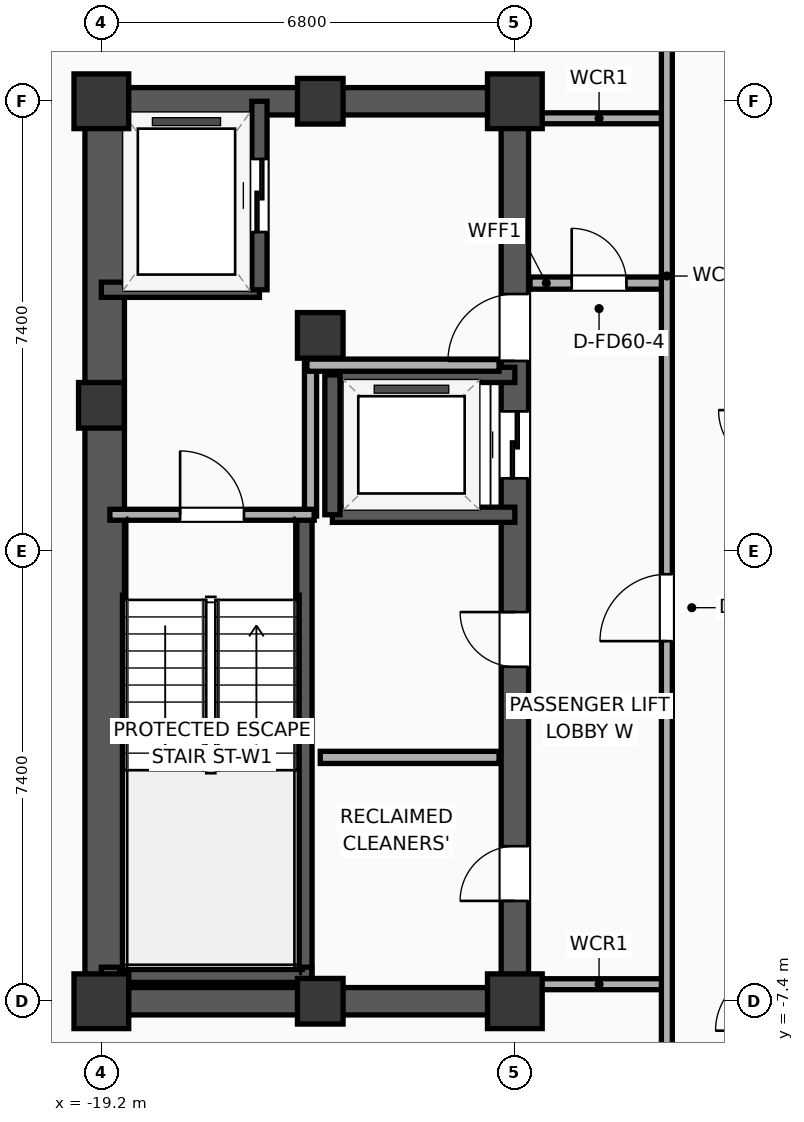
"""IFC4 building model, lengths in metres.
Left out: names, types, materials, properties, quantities, classifications, styles, units other than length and angle.
Written with IfcOpenShell. Run it as: python <this file> out.ifc"""

import sys

from ifc_helpers import new_model, si_unit, direction, frame, frame_2d, origin, origin_2d, place, context, subcontext, project, spatial, rectangle, extrude, element, fill, save


model = new_model("IFC4")
c1 = context("Model", 3, precision=1e-05, world=origin(), true_north=direction((0.0, 1.0)))
c2 = subcontext(c1, "Body", "Model", "MODEL_VIEW")
j1 = project(units=[si_unit("LENGTHUNIT", "METRE"), si_unit("PLANEANGLEUNIT", "RADIAN")], contexts=[c1])
p1 = place(None, origin())
s1 = spatial("IfcSite", under=j1, at=p1, CompositionType="ELEMENT")
p2 = place(p1, origin())
s2 = spatial("IfcBuilding", under=s1, at=p2, CompositionType="ELEMENT")
p3 = place(p2, frame((0.0, 0.0, 215.8)))
s3 = spatial("IfcBuildingStorey", under=s2, at=p3, CompositionType="ELEMENT", Elevation=215.8)
p4 = place(p3, frame((-19.2, -7.4, 0.0), z_axis=(0.0, 0.0, 1.0), x_axis=(1.0, 0.0, 0.0)))
e1 = element("IfcColumn", 1, at=p4, inside=s3, PredefinedType="COLUMN", context=c2, shape_type="SweptSolid", body=[
    extrude(rectangle(XDim=0.9, YDim=0.9, at=origin_2d()), origin(), (0.0, 0.0, 1.0), 3.9),
])
p5 = place(p3, frame((-19.2, 2.4, 0.0), z_axis=(0.0, 0.0, 1.0), x_axis=(1.0, 0.0, 0.0)))
e2 = element("IfcColumn", 2, at=p5, inside=s3, PredefinedType="COLUMN", context=c2, shape_type="SweptSolid", body=[
    extrude(rectangle(XDim=0.75, YDim=0.75, at=origin_2d()), origin(), (0.0, 0.0, 1.0), 3.9),
])
p6 = place(p3, frame((-19.2, 7.4, 0.0), z_axis=(0.0, 0.0, 1.0), x_axis=(1.0, 0.0, 0.0)))
e3 = element("IfcColumn", 3, at=p6, inside=s3, PredefinedType="COLUMN", context=c2, shape_type="SweptSolid", body=[
    extrude(rectangle(XDim=0.9, YDim=0.9, at=origin_2d()), origin(), (0.0, 0.0, 1.0), 3.9),
])
for number, where, z_axis, x_axis in (
    (4, (-15.6, -7.4, 0.0), (0.0, 0.0, 1.0), (1.0, 0.0, 0.0)),
    (5, (-15.6, 7.4, 0.0), (0.0, 0.0, 1.0), (1.0, 0.0, 0.0)),
):
    element("IfcColumn", number, at=place(p3, frame(where, z_axis=z_axis, x_axis=x_axis)), inside=s3, PredefinedType="COLUMN", context=c2, shape_type="SweptSolid", body=[
        extrude(rectangle(XDim=0.75, YDim=0.75, at=origin_2d()), origin(), (0.0, 0.0, 1.0), 3.9),
    ])
p7 = place(p3, frame((-12.4, -7.4, 0.0), z_axis=(0.0, 0.0, 1.0), x_axis=(1.0, 0.0, 0.0)))
e6 = element("IfcColumn", 6, at=p7, inside=s3, PredefinedType="COLUMN", context=c2, shape_type="SweptSolid", body=[
    extrude(rectangle(XDim=0.9, YDim=0.9, at=origin_2d()), origin(), (0.0, 0.0, 1.0), 3.9),
])
p8 = place(p3, frame((-15.6, 3.55, 0.0), z_axis=(0.0, 0.0, 1.0), x_axis=(1.0, 0.0, 0.0)))
e7 = element("IfcColumn", 7, at=p8, inside=s3, PredefinedType="COLUMN", context=c2, shape_type="SweptSolid", body=[
    extrude(rectangle(XDim=0.75, YDim=0.75, at=origin_2d()), origin(), (0.0, 0.0, 1.0), 3.9),
])
p9 = place(p3, frame((-12.4, 7.4, 0.0), z_axis=(0.0, 0.0, 1.0), x_axis=(1.0, 0.0, 0.0)))
e8 = element("IfcColumn", 8, at=p9, inside=s3, PredefinedType="COLUMN", context=c2, shape_type="SweptSolid", body=[
    extrude(rectangle(XDim=0.9, YDim=0.9, at=origin_2d()), origin(), (0.0, 0.0, 1.0), 3.9),
])
for number, where, z_axis, x_axis in (
    (9, (-19.425, -7.4, 0.0), (0.0, 0.0, 1.0), (1.0, 0.0, 0.0)),
    (10, (-19.425, 7.4, 0.0), (0.0, 0.0, 1.0), (1.0, 0.0, 0.0)),
):
    element("IfcWall", number, at=place(p3, frame(where, z_axis=z_axis, x_axis=x_axis)), inside=s3, PredefinedType="SHEAR", context=c2, shape_type="SweptSolid", body=[
        extrude(rectangle(XDim=7.25, YDim=0.45, at=frame_2d((3.625, 0.0))), origin(), (0.0, 0.0, 1.0), 3.65),
    ])
p10 = place(p3, frame((-19.145, -7.4, 0.0), z_axis=(0.0, 0.0, 1.0), x_axis=(0.0, 1.0, 0.0)))
e11 = element("IfcWall", 11, at=p10, inside=s3, PredefinedType="SHEAR", context=c2, shape_type="SweptSolid", body=[
    extrude(rectangle(XDim=14.8, YDim=0.65, at=frame_2d((7.4, 0.0))), origin(), (0.0, 0.0, 1.0), 3.65),
])
p11 = place(p3, frame((-12.4, -7.4, 0.0), z_axis=(0.0, 0.0, 1.0), x_axis=(0.0, 1.0, 0.0)))
e12 = element("IfcWall", 12, at=p11, inside=s3, PredefinedType="SHEAR", context=c2, shape_type="SweptSolid", body=[
    extrude(rectangle(XDim=14.8, YDim=0.45, at=frame_2d((7.4, 0.0))), origin(), (0.0, 0.0, 1.0), 3.65),
])
p12 = place(p11, frame((8.6, 0.0, 0.0)))
e13 = element("IfcOpeningElement", 13, at=p12, cuts=e12, PredefinedType="OPENING", context=c2, shape_type="SweptSolid", body=[
    extrude(rectangle(XDim=1.1, YDim=2.05, at=frame_2d((0.55, 1.025))), frame((0.0, 0.235, 0.0), z_axis=(0.0, -1.0, 0.0), x_axis=(1.0, 0.0, 0.0)), (0.0, 0.0, 1.0), 0.47),
])
p13 = place(p11, frame((10.53, 0.0, 0.0)))
e14 = element("IfcOpeningElement", 14, at=p13, cuts=e12, PredefinedType="OPENING", context=c2, shape_type="SweptSolid", body=[
    extrude(rectangle(XDim=1.1, YDim=2.05, at=frame_2d((0.55, 1.025))), frame((0.0, 0.235, 0.0), z_axis=(0.0, -1.0, 0.0), x_axis=(1.0, 0.0, 0.0)), (0.0, 0.0, 1.0), 0.47),
])
p14 = place(p11, frame((1.65, 0.0, 0.0)))
e15 = element("IfcOpeningElement", 15, at=p14, cuts=e12, PredefinedType="OPENING", context=c2, shape_type="SweptSolid", body=[
    extrude(rectangle(XDim=0.9, YDim=2.05, at=frame_2d((0.45, 1.025))), frame((0.0, 0.235, 0.0), z_axis=(0.0, -1.0, 0.0), x_axis=(1.0, 0.0, 0.0)), (0.0, 0.0, 1.0), 0.47),
])
p15 = place(p11, frame((5.5, 0.0, 0.0)))
e16 = element("IfcOpeningElement", 16, at=p15, cuts=e12, PredefinedType="OPENING", context=c2, shape_type="SweptSolid", body=[
    extrude(rectangle(XDim=0.9, YDim=2.05, at=frame_2d((0.45, 1.025))), frame((0.0, 0.235, 0.0), z_axis=(0.0, -1.0, 0.0), x_axis=(1.0, 0.0, 0.0)), (0.0, 0.0, 1.0), 0.47),
])
p16 = place(p3, frame((-15.86, -7.085, 0.0), z_axis=(0.0, 0.0, 1.0), x_axis=(0.0, 1.0, 0.0)))
e17 = element("IfcWall", 17, at=p16, inside=s3, PredefinedType="SOLIDWALL", context=c2, shape_type="SweptSolid", body=[
    extrude(rectangle(XDim=7.685, YDim=0.25, at=frame_2d((3.843, 0.0))), origin(), (0.0, 0.0, 1.0), 3.65),
])
p17 = place(p3, frame((-19.2, -6.965, 0.0), z_axis=(0.0, 0.0, 1.0), x_axis=(1.0, 0.0, 0.0)))
e18 = element("IfcWall", 18, at=p17, inside=s3, PredefinedType="SOLIDWALL", context=c2, shape_type="SweptSolid", body=[
    extrude(rectangle(XDim=3.46, YDim=0.25, at=frame_2d((1.73, 0.0))), origin(), (0.0, 0.0, 1.0), 3.65),
])
p18 = place(p3, frame((-19.2, 4.3, 0.0), z_axis=(0.0, 0.0, 1.0), x_axis=(1.0, 0.0, 0.0)))
e19 = element("IfcWall", 19, at=p18, inside=s3, PredefinedType="SOLIDWALL", context=c2, shape_type="SweptSolid", body=[
    extrude(rectangle(XDim=2.6, YDim=0.25, at=frame_2d((1.3, 0.0))), origin(), (0.0, 0.0, 1.0), 3.65),
])
p19 = place(p3, frame((-16.6, 4.3, 0.0), z_axis=(0.0, 0.0, 1.0), x_axis=(0.0, 1.0, 0.0)))
e20 = element("IfcWall", 20, at=p19, inside=s3, PredefinedType="SOLIDWALL", context=c2, shape_type="SweptSolid", body=[
    extrude(rectangle(XDim=3.1, YDim=0.25, at=frame_2d((1.55, 0.0))), origin(), (0.0, 0.0, 1.0), 3.65),
])
p20 = place(p19, frame((0.95, 0.0, 0.0)))
e21 = element("IfcOpeningElement", 21, at=p20, cuts=e20, PredefinedType="OPENING", context=c2, shape_type="SweptSolid", body=[
    extrude(rectangle(XDim=1.2, YDim=2.05, at=frame_2d((0.6, 1.025))), frame((0.0, 0.135, 0.0), z_axis=(0.0, -1.0, 0.0), x_axis=(1.0, 0.0, 0.0)), (0.0, 0.0, 1.0), 0.27),
])
for number, where, z_axis, x_axis in (
    (22, (-15.4, 0.6, 0.0), (0.0, 0.0, 1.0), (1.0, 0.0, 0.0)),
    (23, (-12.4, 2.9, 0.0), (0.0, 0.0, 1.0), (-1.0, 0.0, 0.0)),
):
    element("IfcWall", number, at=place(p3, frame(where, z_axis=z_axis, x_axis=x_axis)), inside=s3, PredefinedType="SOLIDWALL", context=c2, shape_type="SweptSolid", body=[
        extrude(rectangle(XDim=3.0, YDim=0.25, at=frame_2d((1.5, 0.0))), origin(), (0.0, 0.0, 1.0), 3.65),
    ])
p21 = place(p3, frame((-15.4, 2.9, 0.0), z_axis=(0.0, 0.0, 1.0), x_axis=(0.0, -1.0, 0.0)))
e24 = element("IfcWall", 24, at=p21, inside=s3, PredefinedType="SOLIDWALL", context=c2, shape_type="SweptSolid", body=[
    extrude(rectangle(XDim=2.3, YDim=0.25, at=frame_2d((1.15, 0.0))), origin(), (0.0, 0.0, 1.0), 3.65),
])
p22 = place(p3, frame((-15.76, 0.58, 0.0), z_axis=(0.0, 0.0, 1.0), x_axis=(0.0, 1.0, 0.0)))
e25 = element("IfcWall", 25, at=p22, inside=s3, PredefinedType="PARTITIONING", context=c2, shape_type="SweptSolid", body=[
    extrude(rectangle(XDim=2.52, YDim=0.2, at=frame_2d((1.26, 0.0))), origin(), (0.0, 0.0, 1.0), 3.65),
])
p23 = place(p3, frame((-15.82, 3.06, 0.0), z_axis=(0.0, 0.0, 1.0), x_axis=(1.0, 0.0, 0.0)))
e26 = element("IfcWall", 26, at=p23, inside=s3, PredefinedType="PARTITIONING", context=c2, shape_type="SweptSolid", body=[
    extrude(rectangle(XDim=3.16, YDim=0.2, at=frame_2d((1.58, 0.0))), origin(), (0.0, 0.0, 1.0), 3.65),
])
p24 = place(p3, frame((-19.06, 0.6, 0.0), z_axis=(0.0, 0.0, 1.0), x_axis=(1.0, 0.0, 0.0)))
e27 = element("IfcWall", 27, at=p24, inside=s3, PredefinedType="PARTITIONING", context=c2, shape_type="SweptSolid", body=[
    extrude(rectangle(XDim=3.36, YDim=0.18, at=frame_2d((1.68, 0.0))), origin(), (0.0, 0.0, 1.0), 3.65),
])
p25 = place(p24, frame((1.155, 0.0, 0.0)))
e28 = element("IfcOpeningElement", 28, at=p25, cuts=e27, PredefinedType="OPENING", context=c2, shape_type="SweptSolid", body=[
    extrude(rectangle(XDim=1.05, YDim=2.05, at=frame_2d((0.525, 1.025))), frame((0.0, 0.1, 0.0), z_axis=(0.0, -1.0, 0.0), x_axis=(1.0, 0.0, 0.0)), (0.0, 0.0, 1.0), 0.2),
])
p26 = place(p3, frame((-15.6, -3.39, 0.0), z_axis=(0.0, 0.0, 1.0), x_axis=(1.0, 0.0, 0.0)))
e29 = element("IfcWall", 29, at=p26, inside=s3, PredefinedType="PARTITIONING", context=c2, shape_type="SweptSolid", body=[
    extrude(rectangle(XDim=2.94, YDim=0.2, at=frame_2d((1.47, 0.0))), origin(), (0.0, 0.0, 1.0), 3.65),
])
p27 = place(p3, frame((-12.15, 4.41, 0.0), z_axis=(0.0, 0.0, 1.0), x_axis=(1.0, 0.0, 0.0)))
e30 = element("IfcWall", 30, at=p27, inside=s3, PredefinedType="PARTITIONING", context=c2, shape_type="SweptSolid", body=[
    extrude(rectangle(XDim=2.27, YDim=0.2, at=frame_2d((1.135, 0.0))), origin(), (0.0, 0.0, 1.0), 3.65),
])
p28 = place(p27, frame((0.685, 0.0, 0.0)))
e31 = element("IfcOpeningElement", 31, at=p28, cuts=e30, PredefinedType="OPENING", context=c2, shape_type="SweptSolid", body=[
    extrude(rectangle(XDim=0.9, YDim=2.05, at=frame_2d((0.45, 1.025))), frame((0.0, 0.11, 0.0), z_axis=(0.0, -1.0, 0.0), x_axis=(1.0, 0.0, 0.0)), (0.0, 0.0, 1.0), 0.22),
])
for number, where, z_axis, x_axis in (
    (32, (-12.15, 7.12, 0.0), (0.0, 0.0, 1.0), (1.0, 0.0, 0.0)),
    (33, (-12.15, -7.12, 0.0), (0.0, 0.0, 1.0), (1.0, 0.0, 0.0)),
):
    element("IfcWall", number, at=place(p3, frame(where, z_axis=z_axis, x_axis=x_axis)), inside=s3, PredefinedType="PARTITIONING", context=c2, shape_type="SweptSolid", body=[
        extrude(rectangle(XDim=2.27, YDim=0.18, at=frame_2d((1.135, 0.0))), origin(), (0.0, 0.0, 1.0), 3.65),
    ])
p29 = place(p3, frame((-9.9, -9.28, 0.0), z_axis=(0.0, 0.0, 1.0), x_axis=(0.0, 1.0, 0.0)))
e34 = element("IfcWall", 34, at=p29, inside=s3, PredefinedType="PARTITIONING", context=c2, shape_type="SweptSolid", body=[
    extrude(rectangle(XDim=18.56, YDim=0.18, at=frame_2d((9.28, 0.0))), origin(), (0.0, 0.0, 1.0), 3.65),
])
p30 = place(p29, frame((7.802, 0.0, 0.0)))
e35 = element("IfcOpeningElement", 35, at=p30, cuts=e34, PredefinedType="OPENING", context=c2, shape_type="SweptSolid", body=[
    extrude(rectangle(XDim=1.1, YDim=2.05, at=frame_2d((0.55, 1.025))), frame((0.0, 0.1, 0.0), z_axis=(0.0, -1.0, 0.0), x_axis=(1.0, 0.0, 0.0)), (0.0, 0.0, 1.0), 0.2),
])
p31 = place(p20, origin())
e36 = element("IfcDoor", 36, at=p31, inside=s3, OperationType="SLIDING_TO_LEFT", PredefinedType="DOOR", context=c2, shape_type="SweptSolid", body=[
    extrude(rectangle(XDim=1.2, YDim=2.05, at=frame_2d((0.6, 1.025))), frame((0.0, 0.025, 0.0), z_axis=(0.0, -1.0, 0.0), x_axis=(1.0, 0.0, 0.0)), (0.0, 0.0, 1.0), 0.05),
])
fill(e21, e36)
p32 = place(p12, origin())
e37 = element("IfcDoor", 37, at=p32, inside=s3, OperationType="SLIDING_TO_LEFT", PredefinedType="DOOR", context=c2, shape_type="SweptSolid", body=[
    extrude(rectangle(XDim=1.1, YDim=2.05, at=frame_2d((0.55, 1.025))), frame((0.0, 0.025, 0.0), z_axis=(0.0, -1.0, 0.0), x_axis=(1.0, 0.0, 0.0)), (0.0, 0.0, 1.0), 0.05),
])
fill(e13, e37)
p33 = place(p25, origin())
e38 = element("IfcDoor", 38, at=p33, inside=s3, OperationType="SINGLE_SWING_LEFT", PredefinedType="DOOR", context=c2, shape_type="SweptSolid", body=[
    extrude(rectangle(XDim=1.05, YDim=2.05, at=frame_2d((0.525, 1.025))), frame((0.0, 0.025, 0.0), z_axis=(0.0, -1.0, 0.0), x_axis=(1.0, 0.0, 0.0)), (0.0, 0.0, 1.0), 0.05),
])
fill(e28, e38)
p34 = place(p28, origin())
e39 = element("IfcDoor", 39, at=p34, inside=s3, OperationType="SINGLE_SWING_LEFT", PredefinedType="DOOR", context=c2, shape_type="SweptSolid", body=[
    extrude(rectangle(XDim=0.9, YDim=2.05, at=frame_2d((0.45, 1.025))), frame((0.0, 0.025, 0.0), z_axis=(0.0, -1.0, 0.0), x_axis=(1.0, 0.0, 0.0)), (0.0, 0.0, 1.0), 0.05),
])
fill(e31, e39)
p35 = place(p30, origin())
e40 = element("IfcDoor", 40, at=p35, inside=s3, OperationType="SINGLE_SWING_LEFT", PredefinedType="DOOR", context=c2, shape_type="SweptSolid", body=[
    extrude(rectangle(XDim=1.1, YDim=2.05, at=frame_2d((0.55, 1.025))), frame((0.0, 0.025, 0.0), z_axis=(0.0, -1.0, 0.0), x_axis=(1.0, 0.0, 0.0)), (0.0, 0.0, 1.0), 0.05),
])
fill(e35, e40)
p36 = place(p13, origin())
e41 = element("IfcDoor", 41, at=p36, inside=s3, OperationType="SINGLE_SWING_LEFT", PredefinedType="DOOR", context=c2, shape_type="SweptSolid", body=[
    extrude(rectangle(XDim=1.1, YDim=2.05, at=frame_2d((0.55, 1.025))), frame((0.0, 0.025, 0.0), z_axis=(0.0, -1.0, 0.0), x_axis=(1.0, 0.0, 0.0)), (0.0, 0.0, 1.0), 0.05),
])
fill(e14, e41)
p37 = place(p14, origin())
e42 = element("IfcDoor", 42, at=p37, inside=s3, OperationType="SINGLE_SWING_LEFT", PredefinedType="DOOR", context=c2, shape_type="SweptSolid", body=[
    extrude(rectangle(XDim=0.9, YDim=2.05, at=frame_2d((0.45, 1.025))), frame((0.0, 0.025, 0.0), z_axis=(0.0, -1.0, 0.0), x_axis=(1.0, 0.0, 0.0)), (0.0, 0.0, 1.0), 0.05),
])
fill(e15, e42)
p38 = place(p15, origin())
e43 = element("IfcDoor", 43, at=p38, inside=s3, OperationType="SINGLE_SWING_RIGHT", PredefinedType="DOOR", context=c2, shape_type="SweptSolid", body=[
    extrude(rectangle(XDim=0.9, YDim=2.05, at=frame_2d((0.45, 1.025))), frame((0.0, 0.025, 0.0), z_axis=(0.0, -1.0, 0.0), x_axis=(1.0, 0.0, 0.0)), (0.0, 0.0, 1.0), 0.05),
])
fill(e16, e43)
save(model, sys.argv[1])
